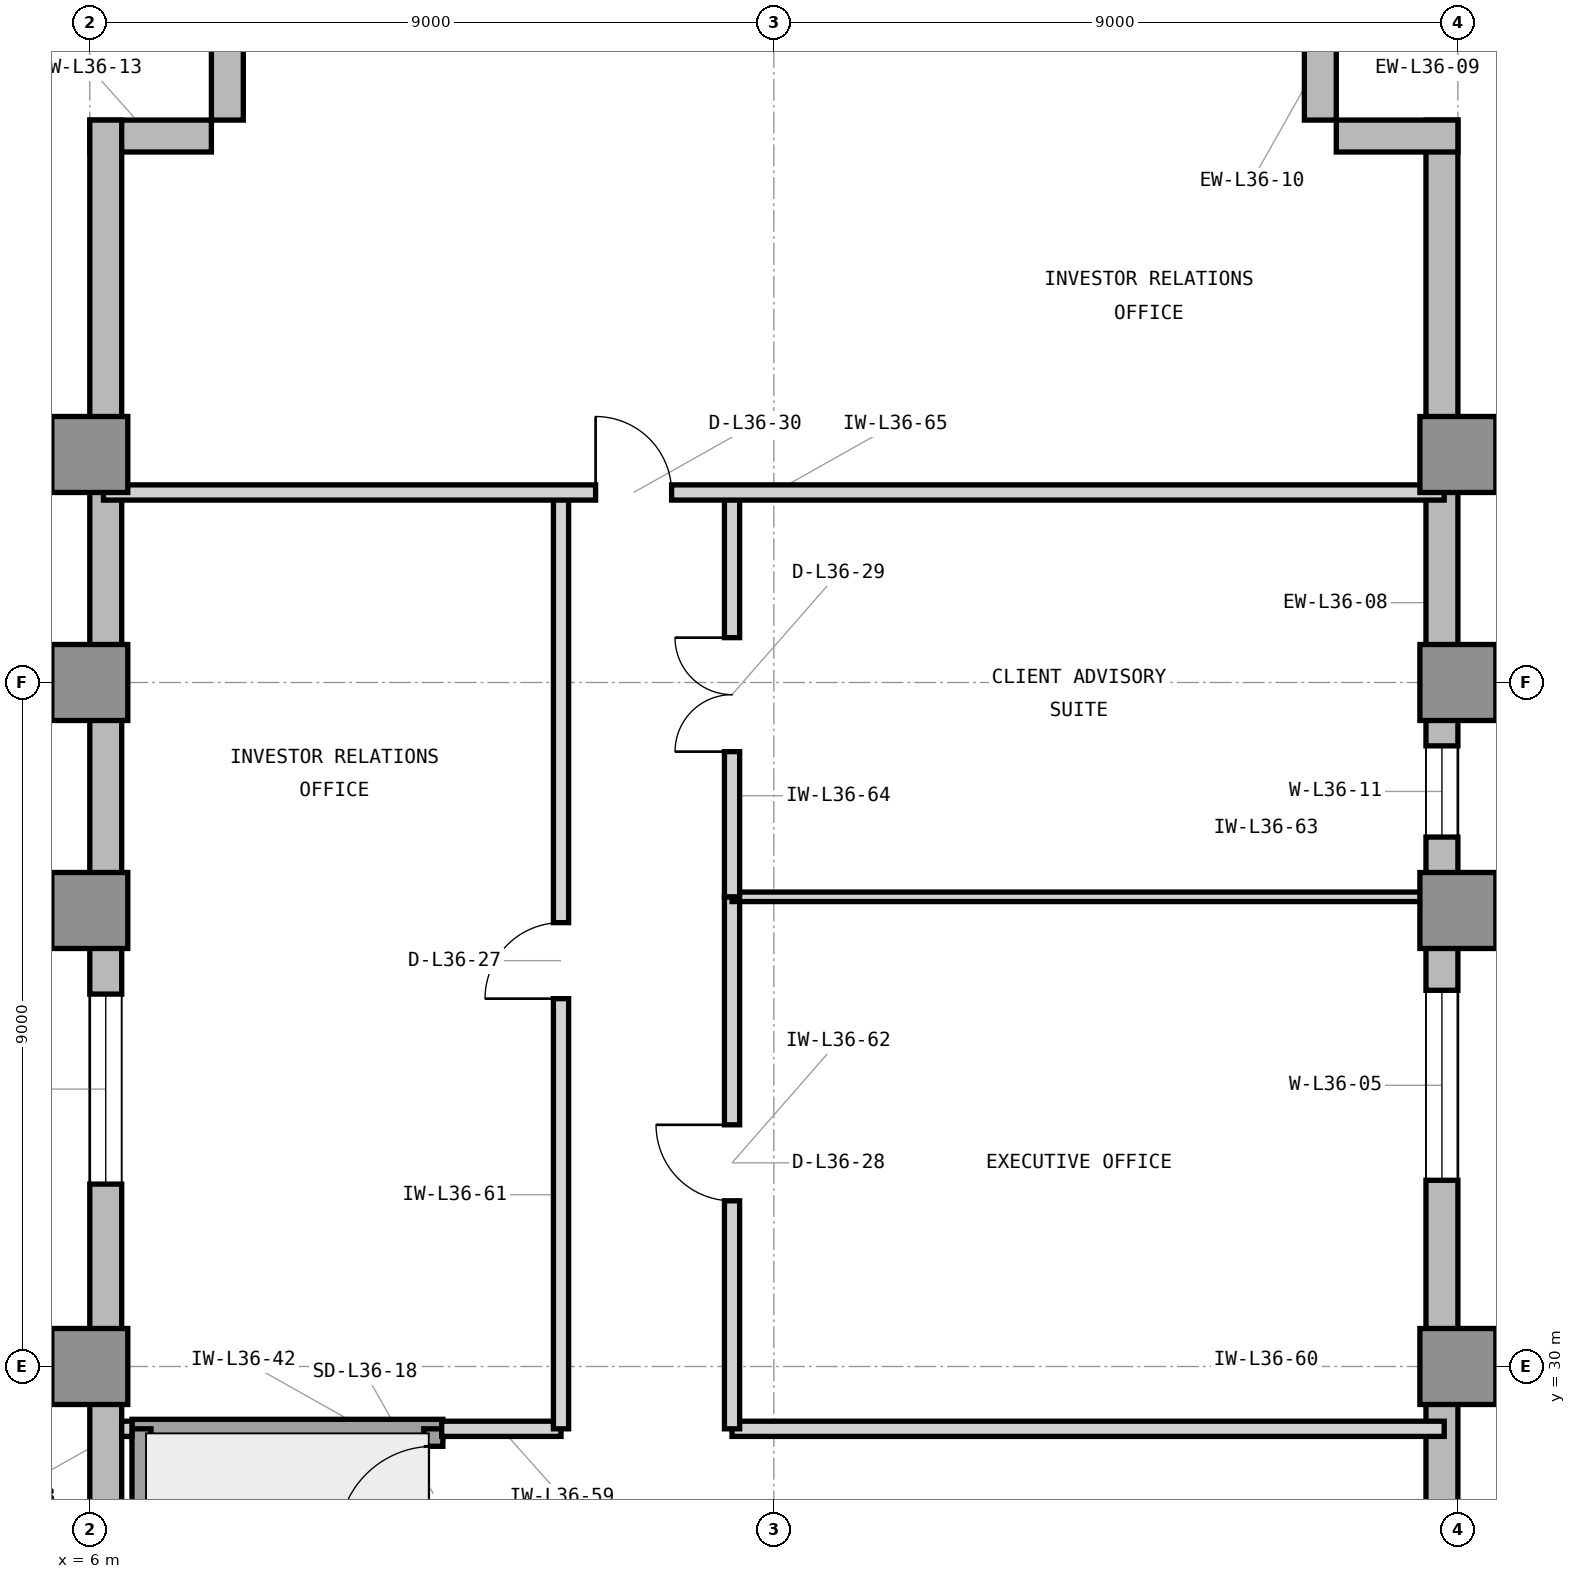
"""IFC4 building model, lengths in metres.
Left out: names, types, materials, properties, quantities, classifications, styles, units other than length and angle.
Written with IfcOpenShell. Run it as: python <this file> out.ifc"""

import sys

from ifc_helpers import new_model, si_unit, direction, frame, frame_2d, origin, origin_2d, place, context, subcontext, project, spatial, rectangle, extrude, element, fill, save


model = new_model("IFC4")
c1 = context("Model", 3, precision=1e-05, world=origin(), true_north=direction((0.0, 1.0)))
c2 = subcontext(c1, "Body", "Model", "MODEL_VIEW")
j1 = project(units=[si_unit("LENGTHUNIT", "METRE"), si_unit("PLANEANGLEUNIT", "RADIAN")], contexts=[c1])
p1 = place(None, origin())
s1 = spatial("IfcSite", under=j1, at=p1, CompositionType="ELEMENT")
p2 = place(p1, origin())
s2 = spatial("IfcBuilding", under=s1, at=p2, CompositionType="ELEMENT")
p3 = place(p2, frame((0.0, 0.0, 151.8)))
s3 = spatial("IfcBuildingStorey", under=s2, at=p3, CompositionType="ELEMENT", Elevation=151.8)
for number, where, z_axis, x_axis in (
    (1, (6.0, 30.0, 0.0), (0.0, 0.0, 1.0), (1.0, 0.0, 0.0)),
    (2, (24.0, 30.0, 0.0), (0.0, 0.0, 1.0), (1.0, 0.0, 0.0)),
    (3, (6.0, 36.0, 0.0), (0.0, 0.0, 1.0), (1.0, 0.0, 0.0)),
    (4, (24.0, 36.0, 0.0), (0.0, 0.0, 1.0), (1.0, 0.0, 0.0)),
    (5, (6.0, 39.0, 0.0), (0.0, 0.0, 1.0), (1.0, 0.0, 0.0)),
    (6, (24.0, 39.0, 0.0), (0.0, 0.0, 1.0), (1.0, 0.0, 0.0)),
    (7, (6.0, 42.0, 0.0), (0.0, 0.0, 1.0), (1.0, 0.0, 0.0)),
    (8, (24.0, 42.0, 0.0), (0.0, 0.0, 1.0), (1.0, 0.0, 0.0)),
):
    element("IfcColumn", number, at=place(p3, frame(where, z_axis=z_axis, x_axis=x_axis)), inside=s3, PredefinedType="COLUMN", context=c2, shape_type="SweptSolid", body=[
        extrude(rectangle(XDim=1.0, YDim=1.0, at=origin_2d()), origin(), (0.0, 0.0, 1.0), 3.9),
    ])
p4 = place(p3, frame((23.79, 21.0, 0.0), z_axis=(0.0, 0.0, 1.0), x_axis=(0.0, 1.0, 0.0)))
e9 = element("IfcWall", 9, at=p4, inside=s3, PredefinedType="STANDARD", context=c2, shape_type="SweptSolid", body=[
    extrude(rectangle(XDim=25.4, YDim=0.42, at=frame_2d((12.7, 0.0))), origin(), (0.0, 0.0, 1.0), 3.62),
])
p5 = place(p4, frame((11.45, 0.0, 0.85)))
e10 = element("IfcOpeningElement", 10, at=p5, cuts=e9, PredefinedType="OPENING", context=c2, shape_type="SweptSolid", body=[
    extrude(rectangle(XDim=2.5, YDim=2.25, at=frame_2d((1.25, 1.125))), frame((0.0, 0.22, 0.0), z_axis=(0.0, -1.0, 0.0), x_axis=(1.0, 0.0, 0.0)), (0.0, 0.0, 1.0), 0.44),
])
p6 = place(p4, frame((15.966, 0.0, 0.85)))
e11 = element("IfcOpeningElement", 11, at=p6, cuts=e9, PredefinedType="OPENING", context=c2, shape_type="SweptSolid", body=[
    extrude(rectangle(XDim=1.2, YDim=2.25, at=frame_2d((0.6, 1.125))), frame((0.0, 0.22, 0.0), z_axis=(0.0, -1.0, 0.0), x_axis=(1.0, 0.0, 0.0)), (0.0, 0.0, 1.0), 0.44),
])
for number, where, z_axis, x_axis in (
    (12, (24.0, 46.19, 0.0), (0.0, 0.0, 1.0), (-1.0, 0.0, 0.0)),
    (13, (22.19, 46.4, 0.0), (0.0, 0.0, 1.0), (0.0, 1.0, 0.0)),
    (14, (7.81, 48.0, 0.0), (0.0, 0.0, 1.0), (0.0, -1.0, 0.0)),
    (15, (7.6, 46.19, 0.0), (0.0, 0.0, 1.0), (-1.0, 0.0, 0.0)),
):
    element("IfcWall", number, at=place(p3, frame(where, z_axis=z_axis, x_axis=x_axis)), inside=s3, PredefinedType="STANDARD", context=c2, shape_type="SweptSolid", body=[
        extrude(rectangle(XDim=1.6, YDim=0.42, at=frame_2d((0.8, 0.0))), origin(), (0.0, 0.0, 1.0), 3.62),
    ])
p7 = place(p3, frame((6.21, 46.4, 0.0), z_axis=(0.0, 0.0, 1.0), x_axis=(0.0, -1.0, 0.0)))
e16 = element("IfcWall", 16, at=p7, inside=s3, PredefinedType="STANDARD", context=c2, shape_type="SweptSolid", body=[
    extrude(rectangle(XDim=25.5, YDim=0.42, at=frame_2d((12.75, 0.0))), origin(), (0.0, 0.0, 1.0), 3.62),
])
p8 = place(p7, frame((11.5, 0.0, 0.85)))
e17 = element("IfcOpeningElement", 17, at=p8, cuts=e16, PredefinedType="OPENING", context=c2, shape_type="SweptSolid", body=[
    extrude(rectangle(XDim=2.5, YDim=2.25, at=frame_2d((1.25, 1.125))), frame((0.0, 0.22, 0.0), z_axis=(0.0, -1.0, 0.0), x_axis=(1.0, 0.0, 0.0)), (0.0, 0.0, 1.0), 0.44),
])
p9 = place(p3, frame((6.555, 29.18, 0.0), z_axis=(0.0, 0.0, 1.0), x_axis=(1.0, 0.0, 0.0)))
e18 = element("IfcWall", 18, at=p9, inside=s3, PredefinedType="SHEAR", context=c2, shape_type="SweptSolid", body=[
    extrude(rectangle(XDim=4.09, YDim=0.25, at=frame_2d((2.045, 0.0))), origin(), (0.0, 0.0, 1.0), 3.9),
])
p10 = place(p3, frame((6.68, 21.68, 0.0), z_axis=(0.0, 0.0, 1.0), x_axis=(0.0, 1.0, 0.0)))
e19 = element("IfcWall", 19, at=p10, inside=s3, PredefinedType="SHEAR", context=c2, shape_type="SweptSolid", body=[
    extrude(rectangle(XDim=7.5, YDim=0.25, at=frame_2d((3.75, 0.0))), origin(), (0.0, 0.0, 1.0), 3.9),
])
p11 = place(p3, frame((10.52, 21.68, 0.0), z_axis=(0.0, 0.0, 1.0), x_axis=(0.0, 1.0, 0.0)))
e20 = element("IfcWall", 20, at=p11, inside=s3, PredefinedType="SHEAR", context=c2, shape_type="SweptSolid", body=[
    extrude(rectangle(XDim=7.5, YDim=0.25, at=frame_2d((3.75, 0.0))), origin(), (0.0, 0.0, 1.0), 3.9),
])
p12 = place(p11, frame((6.02, 0.0, 0.0)))
e21 = element("IfcOpeningElement", 21, at=p12, cuts=e20, PredefinedType="OPENING", context=c2, shape_type="SweptSolid", body=[
    extrude(rectangle(XDim=1.25, YDim=2.2, at=frame_2d((0.625, 1.1))), frame((0.0, 0.135, 0.0), z_axis=(0.0, -1.0, 0.0), x_axis=(1.0, 0.0, 0.0)), (0.0, 0.0, 1.0), 0.27),
])
p13 = place(p3, frame((6.42, 29.18, 0.0), z_axis=(0.0, 0.0, 1.0), x_axis=(1.0, 0.0, 0.0)))
e22 = element("IfcWall", 22, at=p13, inside=s3, PredefinedType="PARTITIONING", context=c2, shape_type="SweptSolid", body=[
    extrude(rectangle(XDim=0.135, YDim=0.2, at=frame_2d((0.067, 0.0))), origin(), (0.0, 0.0, 1.0), 3.61),
])
p14 = place(p3, frame((10.63, 29.18, 0.0), z_axis=(0.0, 0.0, 1.0), x_axis=(1.0, 0.0, 0.0)))
e23 = element("IfcWall", 23, at=p14, inside=s3, PredefinedType="PARTITIONING", context=c2, shape_type="SweptSolid", body=[
    extrude(rectangle(XDim=1.57, YDim=0.2, at=frame_2d((0.785, 0.0))), origin(), (0.0, 0.0, 1.0), 3.61),
])
p15 = place(p3, frame((14.45, 29.18, 0.0), z_axis=(0.0, 0.0, 1.0), x_axis=(1.0, 0.0, 0.0)))
e24 = element("IfcWall", 24, at=p15, inside=s3, PredefinedType="PARTITIONING", context=c2, shape_type="SweptSolid", body=[
    extrude(rectangle(XDim=9.37, YDim=0.2, at=frame_2d((4.685, 0.0))), origin(), (0.0, 0.0, 1.0), 3.61),
])
p16 = place(p3, frame((12.2, 29.18, 0.0), z_axis=(0.0, 0.0, 1.0), x_axis=(0.0, 1.0, 0.0)))
e25 = element("IfcWall", 25, at=p16, inside=s3, PredefinedType="PARTITIONING", context=c2, shape_type="SweptSolid", body=[
    extrude(rectangle(XDim=12.32, YDim=0.2, at=frame_2d((6.16, 0.0))), origin(), (0.0, 0.0, 1.0), 3.61),
])
p17 = place(p16, frame((5.66, 0.0, 0.0)))
e26 = element("IfcOpeningElement", 26, at=p17, cuts=e25, PredefinedType="OPENING", context=c2, shape_type="SweptSolid", body=[
    extrude(rectangle(XDim=1.0, YDim=2.15, at=frame_2d((0.5, 1.075))), frame((0.0, 0.11, 0.0), z_axis=(0.0, -1.0, 0.0), x_axis=(1.0, 0.0, 0.0)), (0.0, 0.0, 1.0), 0.22),
])
p18 = place(p3, frame((14.45, 29.18, 0.0), z_axis=(0.0, 0.0, 1.0), x_axis=(0.0, 1.0, 0.0)))
e27 = element("IfcWall", 27, at=p18, inside=s3, PredefinedType="PARTITIONING", context=c2, shape_type="SweptSolid", body=[
    extrude(rectangle(XDim=7.0, YDim=0.2, at=frame_2d((3.5, 0.0))), origin(), (0.0, 0.0, 1.0), 3.61),
])
p19 = place(p18, frame((3.0, 0.0, 0.0)))
e28 = element("IfcOpeningElement", 28, at=p19, cuts=e27, PredefinedType="OPENING", context=c2, shape_type="SweptSolid", body=[
    extrude(rectangle(XDim=1.0, YDim=2.15, at=frame_2d((0.5, 1.075))), frame((0.0, 0.11, 0.0), z_axis=(0.0, -1.0, 0.0), x_axis=(1.0, 0.0, 0.0)), (0.0, 0.0, 1.0), 0.22),
])
p20 = place(p3, frame((14.45, 36.18, 0.0), z_axis=(0.0, 0.0, 1.0), x_axis=(1.0, 0.0, 0.0)))
e29 = element("IfcWall", 29, at=p20, inside=s3, PredefinedType="PARTITIONING", context=c2, shape_type="SweptSolid", body=[
    extrude(rectangle(XDim=9.37, YDim=0.125, at=frame_2d((4.685, 0.0))), origin(), (0.0, 0.0, 1.0), 2.754),
])
p21 = place(p3, frame((14.45, 36.18, 0.0), z_axis=(0.0, 0.0, 1.0), x_axis=(0.0, 1.0, 0.0)))
e30 = element("IfcWall", 30, at=p21, inside=s3, PredefinedType="PARTITIONING", context=c2, shape_type="SweptSolid", body=[
    extrude(rectangle(XDim=5.32, YDim=0.2, at=frame_2d((2.66, 0.0))), origin(), (0.0, 0.0, 1.0), 3.61),
])
p22 = place(p21, frame((1.91, 0.0, 0.0)))
e31 = element("IfcOpeningElement", 31, at=p22, cuts=e30, PredefinedType="OPENING", context=c2, shape_type="SweptSolid", body=[
    extrude(rectangle(XDim=1.5, YDim=2.3, at=frame_2d((0.75, 1.15))), frame((0.0, 0.11, 0.0), z_axis=(0.0, -1.0, 0.0), x_axis=(1.0, 0.0, 0.0)), (0.0, 0.0, 1.0), 0.22),
])
p23 = place(p3, frame((6.18, 41.5, 0.0), z_axis=(0.0, 0.0, 1.0), x_axis=(1.0, 0.0, 0.0)))
e32 = element("IfcWall", 32, at=p23, inside=s3, PredefinedType="PARTITIONING", context=c2, shape_type="SweptSolid", body=[
    extrude(rectangle(XDim=17.64, YDim=0.2, at=frame_2d((8.82, 0.0))), origin(), (0.0, 0.0, 1.0), 3.61),
])
p24 = place(p23, frame((6.475, 0.0, 0.0)))
e33 = element("IfcOpeningElement", 33, at=p24, cuts=e32, PredefinedType="OPENING", context=c2, shape_type="SweptSolid", body=[
    extrude(rectangle(XDim=1.0, YDim=2.15, at=frame_2d((0.5, 1.075))), frame((0.0, 0.11, 0.0), z_axis=(0.0, -1.0, 0.0), x_axis=(1.0, 0.0, 0.0)), (0.0, 0.0, 1.0), 0.22),
])
p25 = place(p5, origin())
e34 = element("IfcWindow", 34, at=p25, inside=s3, PartitioningType="SINGLE_PANEL", PredefinedType="WINDOW", context=c2, shape_type="SweptSolid", body=[
    extrude(rectangle(XDim=2.5, YDim=2.25, at=frame_2d((1.25, 1.125))), frame((0.0, 0.11, 0.0), z_axis=(0.0, -1.0, 0.0), x_axis=(1.0, 0.0, 0.0)), (0.0, 0.0, 1.0), 0.06),
])
fill(e10, e34)
p26 = place(p8, origin())
e35 = element("IfcWindow", 35, at=p26, inside=s3, PartitioningType="SINGLE_PANEL", PredefinedType="WINDOW", context=c2, shape_type="SweptSolid", body=[
    extrude(rectangle(XDim=2.5, YDim=2.25, at=frame_2d((1.25, 1.125))), frame((0.0, 0.11, 0.0), z_axis=(0.0, -1.0, 0.0), x_axis=(1.0, 0.0, 0.0)), (0.0, 0.0, 1.0), 0.06),
])
fill(e17, e35)
p27 = place(p12, origin())
e36 = element("IfcDoor", 36, at=p27, inside=s3, OperationType="SINGLE_SWING_LEFT", PredefinedType="DOOR", context=c2, shape_type="SweptSolid", body=[
    extrude(rectangle(XDim=1.25, YDim=2.2, at=frame_2d((0.625, 1.1))), frame((0.0, 0.025, 0.0), z_axis=(0.0, -1.0, 0.0), x_axis=(1.0, 0.0, 0.0)), (0.0, 0.0, 1.0), 0.05),
])
fill(e21, e36)
p28 = place(p17, origin())
e37 = element("IfcDoor", 37, at=p28, inside=s3, OperationType="SINGLE_SWING_LEFT", PredefinedType="DOOR", context=c2, shape_type="SweptSolid", body=[
    extrude(rectangle(XDim=1.0, YDim=2.15, at=frame_2d((0.5, 1.075))), frame((0.0, 0.025, 0.0), z_axis=(0.0, -1.0, 0.0), x_axis=(1.0, 0.0, 0.0)), (0.0, 0.0, 1.0), 0.05),
])
fill(e26, e37)
p29 = place(p19, origin())
e38 = element("IfcDoor", 38, at=p29, inside=s3, OperationType="SINGLE_SWING_RIGHT", PredefinedType="DOOR", context=c2, shape_type="SweptSolid", body=[
    extrude(rectangle(XDim=1.0, YDim=2.15, at=frame_2d((0.5, 1.075))), frame((0.0, 0.025, 0.0), z_axis=(0.0, -1.0, 0.0), x_axis=(1.0, 0.0, 0.0)), (0.0, 0.0, 1.0), 0.05),
])
fill(e28, e38)
p30 = place(p22, origin())
e39 = element("IfcDoor", 39, at=p30, inside=s3, OperationType="DOUBLE_DOOR_SINGLE_SWING", PredefinedType="DOOR", context=c2, shape_type="SweptSolid", body=[
    extrude(rectangle(XDim=1.5, YDim=2.3, at=frame_2d((0.75, 1.15))), frame((0.0, 0.025, 0.0), z_axis=(0.0, -1.0, 0.0), x_axis=(1.0, 0.0, 0.0)), (0.0, 0.0, 1.0), 0.05),
])
fill(e31, e39)
p31 = place(p24, origin())
e40 = element("IfcDoor", 40, at=p31, inside=s3, OperationType="SINGLE_SWING_LEFT", PredefinedType="DOOR", context=c2, shape_type="SweptSolid", body=[
    extrude(rectangle(XDim=1.0, YDim=2.15, at=frame_2d((0.5, 1.075))), frame((0.0, 0.025, 0.0), z_axis=(0.0, -1.0, 0.0), x_axis=(1.0, 0.0, 0.0)), (0.0, 0.0, 1.0), 0.05),
])
fill(e33, e40)
p32 = place(p6, origin())
e41 = element("IfcWindow", 41, at=p32, inside=s3, PartitioningType="SINGLE_PANEL", PredefinedType="WINDOW", context=c2, shape_type="SweptSolid", body=[
    extrude(rectangle(XDim=1.2, YDim=2.25, at=frame_2d((0.6, 1.125))), frame((0.0, 0.11, 0.0), z_axis=(0.0, -1.0, 0.0), x_axis=(1.0, 0.0, 0.0)), (0.0, 0.0, 1.0), 0.06),
])
fill(e11, e41)
save(model, sys.argv[1])
